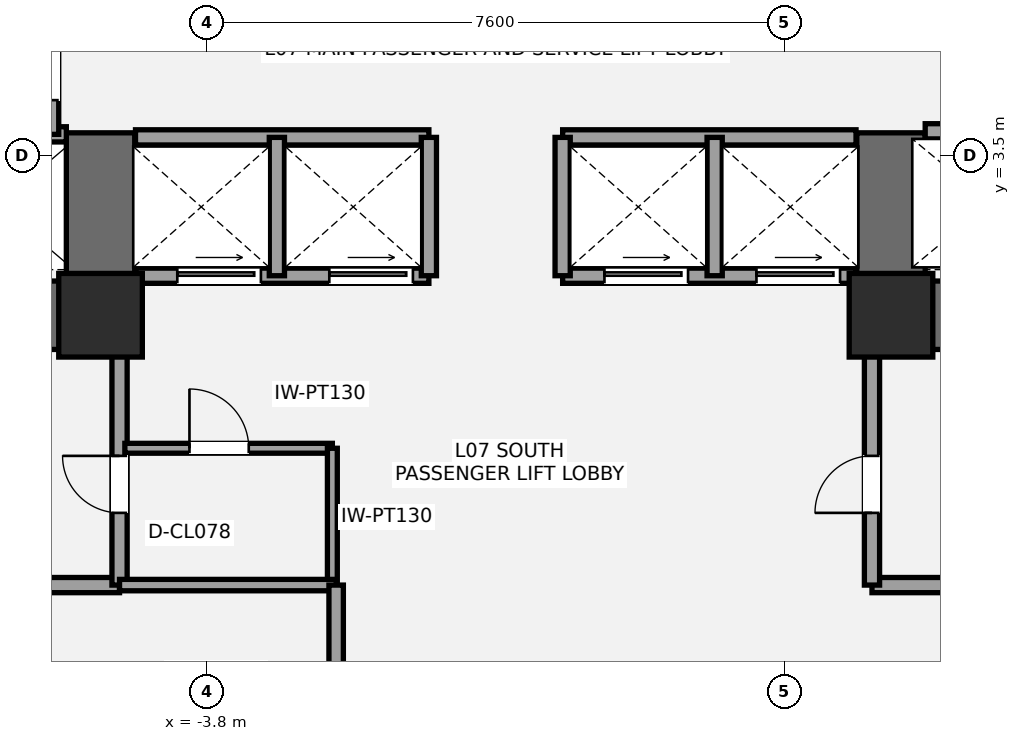
"""IFC4 building model, lengths in metres.
Left out: names, types, materials, properties, quantities, classifications, styles, units other than length and angle.
Written with IfcOpenShell. Run it as: python <this file> out.ifc"""

import sys

from ifc_helpers import new_model, si_unit, direction, frame, frame_2d, origin, origin_2d, place, context, subcontext, project, spatial, rectangle, extrude, element, fill, save


model = new_model("IFC4")
c1 = context("Model", 3, precision=1e-05, world=origin(), true_north=direction((0.0, 1.0)))
c2 = subcontext(c1, "Body", "Model", "MODEL_VIEW")
j1 = project(units=[si_unit("LENGTHUNIT", "METRE"), si_unit("PLANEANGLEUNIT", "RADIAN")], contexts=[c1])
p1 = place(None, origin())
s1 = spatial("IfcSite", under=j1, at=p1, CompositionType="ELEMENT")
p2 = place(p1, origin())
s2 = spatial("IfcBuilding", under=s1, at=p2, CompositionType="ELEMENT")
p3 = place(p2, frame((0.0, 0.0, 30.6)))
s3 = spatial("IfcBuildingStorey", under=s2, at=p3, CompositionType="ELEMENT", Elevation=30.6)
p4 = place(p3, frame((-4.75, 1.4, 0.0), z_axis=(0.0, 0.0, 1.0), x_axis=(-1.0, 0.0, 0.0)))
e1 = element("IfcWall", 1, at=p4, inside=s3, PredefinedType="SHEAR", context=c2, shape_type="SweptSolid", body=[
    extrude(rectangle(XDim=9.3, YDim=0.9, at=frame_2d((4.65, 0.0))), origin(), (0.0, 0.0, 1.0), 3.6),
])
p5 = place(p4, frame((5.55, 0.0, 0.0)))
e2 = element("IfcOpeningElement", 2, at=p5, cuts=e1, PredefinedType="OPENING", context=c2, shape_type="SweptSolid", body=[
    extrude(rectangle(XDim=1.05, YDim=2.15, at=frame_2d((0.525, 1.075))), frame((0.0, 0.46, 0.0), z_axis=(0.0, -1.0, 0.0), x_axis=(1.0, 0.0, 0.0)), (0.0, 0.0, 1.0), 0.92),
])
p6 = place(p4, frame((3.88, 0.0, 0.0)))
e3 = element("IfcOpeningElement", 3, at=p6, cuts=e1, PredefinedType="OPENING", context=c2, shape_type="SweptSolid", body=[
    extrude(rectangle(XDim=1.1, YDim=2.2, at=frame_2d((0.55, 1.1))), frame((0.0, 0.46, 0.0), z_axis=(0.0, -1.0, 0.0), x_axis=(1.0, 0.0, 0.0)), (0.0, 0.0, 1.0), 0.92),
])
p7 = place(p3, frame((-5.2, 0.95, 0.0), z_axis=(0.0, 0.0, 1.0), x_axis=(0.0, 1.0, 0.0)))
e4 = element("IfcWall", 4, at=p7, inside=s3, PredefinedType="SHEAR", context=c2, shape_type="SweptSolid", body=[
    extrude(rectangle(XDim=2.85, YDim=0.9, at=frame_2d((1.425, 0.0))), origin(), (0.0, 0.0, 1.0), 3.6),
])
p8 = place(p3, frame((14.05, 1.4, 0.0), z_axis=(0.0, 0.0, 1.0), x_axis=(-1.0, 0.0, 0.0)))
e5 = element("IfcWall", 5, at=p8, inside=s3, PredefinedType="SHEAR", context=c2, shape_type="SweptSolid", body=[
    extrude(rectangle(XDim=9.3, YDim=0.9, at=frame_2d((4.65, 0.0))), origin(), (0.0, 0.0, 1.0), 3.6),
])
p9 = place(p8, frame((2.7, 0.0, 0.0)))
e6 = element("IfcOpeningElement", 6, at=p9, cuts=e5, PredefinedType="OPENING", context=c2, shape_type="SweptSolid", body=[
    extrude(rectangle(XDim=1.05, YDim=2.15, at=frame_2d((0.525, 1.075))), frame((0.0, 0.46, 0.0), z_axis=(0.0, -1.0, 0.0), x_axis=(1.0, 0.0, 0.0)), (0.0, 0.0, 1.0), 0.92),
])
p10 = place(p8, frame((4.7, 0.0, 0.0)))
e7 = element("IfcOpeningElement", 7, at=p10, cuts=e5, PredefinedType="OPENING", context=c2, shape_type="SweptSolid", body=[
    extrude(rectangle(XDim=1.1, YDim=2.2, at=frame_2d((0.55, 1.1))), frame((0.0, 0.46, 0.0), z_axis=(0.0, -1.0, 0.0), x_axis=(1.0, 0.0, 0.0)), (0.0, 0.0, 1.0), 0.92),
])
p11 = place(p3, frame((5.2, 0.95, 0.0), z_axis=(0.0, 0.0, 1.0), x_axis=(0.0, 1.0, 0.0)))
e8 = element("IfcWall", 8, at=p11, inside=s3, PredefinedType="SHEAR", context=c2, shape_type="SweptSolid", body=[
    extrude(rectangle(XDim=2.85, YDim=0.9, at=frame_2d((1.425, 0.0))), origin(), (0.0, 0.0, 1.0), 3.6),
])
for number, where, z_axis, x_axis in (
    (9, (-5.2, 1.4, 0.0), (0.0, 0.0, 1.0), (1.0, 0.0, 0.0)),
    (10, (5.2, 1.4, 0.0), (0.0, 0.0, 1.0), (1.0, 0.0, 0.0)),
):
    element("IfcColumn", number, at=place(p3, frame(where, z_axis=z_axis, x_axis=x_axis)), inside=s3, PredefinedType="COLUMN", context=c2, shape_type="SweptSolid", body=[
        extrude(rectangle(XDim=1.1, YDim=1.1, at=origin_2d()), origin(), (0.0, 0.0, 1.0), 3.6),
    ])
p12 = place(p3, frame((-7.2, -2.15, 0.0), z_axis=(0.0, 0.0, 1.0), x_axis=(1.0, 0.0, 0.0)))
e11 = element("IfcWall", 11, at=p12, inside=s3, PredefinedType="SOLIDWALL", context=c2, shape_type="SweptSolid", body=[
    extrude(rectangle(XDim=2.25, YDim=0.2, at=frame_2d((1.125, 0.0))), origin(), (0.0, 0.0, 1.0), 3.4),
])
p13 = place(p3, frame((-4.95, -2.15, 0.0), z_axis=(0.0, 0.0, 1.0), x_axis=(0.0, 1.0, 0.0)))
e12 = element("IfcWall", 12, at=p13, inside=s3, PredefinedType="SOLIDWALL", context=c2, shape_type="SweptSolid", body=[
    extrude(rectangle(XDim=3.15, YDim=0.2, at=frame_2d((1.575, 0.0))), origin(), (0.0, 0.0, 1.0), 2.853),
])
p14 = place(p13, frame((0.95, 0.0, 0.0)))
e13 = element("IfcOpeningElement", 13, at=p14, cuts=e12, PredefinedType="OPENING", context=c2, shape_type="SweptSolid", body=[
    extrude(rectangle(XDim=0.75, YDim=2.1, at=frame_2d((0.375, 1.05))), frame((0.0, 0.11, 0.0), z_axis=(0.0, -1.0, 0.0), x_axis=(1.0, 0.0, 0.0)), (0.0, 0.0, 1.0), 0.22),
])
p15 = place(p3, frame((4.95, -2.15, 0.0), z_axis=(0.0, 0.0, 1.0), x_axis=(1.0, 0.0, 0.0)))
e14 = element("IfcWall", 14, at=p15, inside=s3, PredefinedType="SOLIDWALL", context=c2, shape_type="SweptSolid", body=[
    extrude(rectangle(XDim=2.25, YDim=0.2, at=frame_2d((1.125, 0.0))), origin(), (0.0, 0.0, 1.0), 3.4),
])
p16 = place(p3, frame((4.95, -2.15, 0.0), z_axis=(0.0, 0.0, 1.0), x_axis=(0.0, 1.0, 0.0)))
e15 = element("IfcWall", 15, at=p16, inside=s3, PredefinedType="SOLIDWALL", context=c2, shape_type="SweptSolid", body=[
    extrude(rectangle(XDim=3.15, YDim=0.2, at=frame_2d((1.575, 0.0))), origin(), (0.0, 0.0, 1.0), 2.853),
])
p17 = place(p16, frame((0.95, 0.0, 0.0)))
e16 = element("IfcOpeningElement", 16, at=p17, cuts=e15, PredefinedType="OPENING", context=c2, shape_type="SweptSolid", body=[
    extrude(rectangle(XDim=0.75, YDim=2.1, at=frame_2d((0.375, 1.05))), frame((0.0, 0.11, 0.0), z_axis=(0.0, -1.0, 0.0), x_axis=(1.0, 0.0, 0.0)), (0.0, 0.0, 1.0), 0.22),
])
p18 = place(p3, frame((-4.88, -0.35, 0.0), z_axis=(0.0, 0.0, 1.0), x_axis=(1.0, 0.0, 0.0)))
e17 = element("IfcWall", 17, at=p18, inside=s3, PredefinedType="PARTITIONING", context=c2, shape_type="SweptSolid", body=[
    extrude(rectangle(XDim=2.73, YDim=0.13, at=frame_2d((1.365, 0.0))), origin(), (0.0, 0.0, 1.0), 3.4),
])
p19 = place(p18, frame((0.85, 0.0, 0.0)))
e18 = element("IfcOpeningElement", 18, at=p19, cuts=e17, PredefinedType="OPENING", context=c2, shape_type="SweptSolid", body=[
    extrude(rectangle(XDim=0.78, YDim=2.1, at=frame_2d((0.39, 1.05))), frame((0.0, 0.075, 0.0), z_axis=(0.0, -1.0, 0.0), x_axis=(1.0, 0.0, 0.0)), (0.0, 0.0, 1.0), 0.15),
])
p20 = place(p3, frame((-2.15, -2.15, 0.0), z_axis=(0.0, 0.0, 1.0), x_axis=(0.0, 1.0, 0.0)))
e19 = element("IfcWall", 19, at=p20, inside=s3, PredefinedType="PARTITIONING", context=c2, shape_type="SweptSolid", body=[
    extrude(rectangle(XDim=1.8, YDim=0.13, at=frame_2d((0.9, 0.0))), origin(), (0.0, 0.0, 1.0), 3.4),
])
p21 = place(p3, frame((-9.78, 3.78, 0.0), z_axis=(0.0, 0.0, 1.0), x_axis=(1.0, 0.0, 0.0)))
e20 = element("IfcWall", 20, at=p21, inside=s3, PredefinedType="SOLIDWALL", context=c2, shape_type="SweptSolid", body=[
    extrude(rectangle(XDim=4.13, YDim=0.2, at=frame_2d((2.065, 0.0))), origin(), (0.0, 0.0, 1.0), 3.4),
])
p22 = place(p3, frame((-5.85, 3.78, 0.0), z_axis=(0.0, 0.0, 1.0), x_axis=(0.0, 1.0, 0.0)))
e21 = element("IfcWall", 21, at=p22, inside=s3, PredefinedType="SOLIDWALL", context=c2, shape_type="SweptSolid", body=[
    extrude(rectangle(XDim=1.69, YDim=0.2, at=frame_2d((0.845, 0.0))), origin(), (0.0, 0.0, 1.0), 3.4),
])
p23 = place(p22, frame((0.45, 0.0, 0.0)))
e22 = element("IfcOpeningElement", 22, at=p23, cuts=e21, PredefinedType="OPENING", context=c2, shape_type="SweptSolid", body=[
    extrude(rectangle(XDim=0.75, YDim=2.1, at=frame_2d((0.375, 1.05))), frame((0.0, 0.11, 0.0), z_axis=(0.0, -1.0, 0.0), x_axis=(1.0, 0.0, 0.0)), (0.0, 0.0, 1.0), 0.22),
])
p24 = place(p3, frame((5.65, 3.82, 0.0), z_axis=(0.0, 0.0, 1.0), x_axis=(1.0, 0.0, 0.0)))
e23 = element("IfcWall", 23, at=p24, inside=s3, PredefinedType="SOLIDWALL", context=c2, shape_type="SweptSolid", body=[
    extrude(rectangle(XDim=4.13, YDim=0.2, at=frame_2d((2.065, 0.0))), origin(), (0.0, 0.0, 1.0), 3.4),
])
p25 = place(p24, frame((0.65, 0.0, 0.0)))
e24 = element("IfcOpeningElement", 24, at=p25, cuts=e23, PredefinedType="OPENING", context=c2, shape_type="SweptSolid", body=[
    extrude(rectangle(XDim=1.2, YDim=2.2, at=frame_2d((0.6, 1.1))), frame((0.0, 0.11, 0.0), z_axis=(0.0, -1.0, 0.0), x_axis=(1.0, 0.0, 0.0)), (0.0, 0.0, 1.0), 0.22),
])
p26 = place(p3, frame((-4.74, 1.92, 0.0), z_axis=(0.0, 0.0, 1.0), x_axis=(1.0, 0.0, 0.0)))
e25 = element("IfcWall", 25, at=p26, inside=s3, PredefinedType="SOLIDWALL", context=c2, shape_type="SweptSolid", body=[
    extrude(rectangle(XDim=3.86, YDim=0.2, at=frame_2d((1.93, 0.0))), origin(), (0.0, 0.0, 1.0), 2.39),
])
p27 = place(p26, frame((0.55, 0.0, 0.0)))
e26 = element("IfcOpeningElement", 26, at=p27, cuts=e25, PredefinedType="OPENING", context=c2, shape_type="SweptSolid", body=[
    extrude(rectangle(XDim=1.1, YDim=2.2, at=frame_2d((0.55, 1.1))), frame((0.0, 0.11, 0.0), z_axis=(0.0, -1.0, 0.0), x_axis=(1.0, 0.0, 0.0)), (0.0, 0.0, 1.0), 0.22),
])
p28 = place(p26, frame((2.55, 0.0, 0.0)))
e27 = element("IfcOpeningElement", 27, at=p28, cuts=e25, PredefinedType="OPENING", context=c2, shape_type="SweptSolid", body=[
    extrude(rectangle(XDim=1.1, YDim=2.2, at=frame_2d((0.55, 1.1))), frame((0.0, 0.11, 0.0), z_axis=(0.0, -1.0, 0.0), x_axis=(1.0, 0.0, 0.0)), (0.0, 0.0, 1.0), 0.22),
])
p29 = place(p3, frame((0.88, 1.92, 0.0), z_axis=(0.0, 0.0, 1.0), x_axis=(1.0, 0.0, 0.0)))
e28 = element("IfcWall", 28, at=p29, inside=s3, PredefinedType="SOLIDWALL", context=c2, shape_type="SweptSolid", body=[
    extrude(rectangle(XDim=3.86, YDim=0.2, at=frame_2d((1.93, 0.0))), origin(), (0.0, 0.0, 1.0), 2.39),
])
p30 = place(p29, frame((0.55, 0.0, 0.0)))
e29 = element("IfcOpeningElement", 29, at=p30, cuts=e28, PredefinedType="OPENING", context=c2, shape_type="SweptSolid", body=[
    extrude(rectangle(XDim=1.1, YDim=2.2, at=frame_2d((0.55, 1.1))), frame((0.0, 0.11, 0.0), z_axis=(0.0, -1.0, 0.0), x_axis=(1.0, 0.0, 0.0)), (0.0, 0.0, 1.0), 0.22),
])
p31 = place(p29, frame((2.55, 0.0, 0.0)))
e30 = element("IfcOpeningElement", 30, at=p31, cuts=e28, PredefinedType="OPENING", context=c2, shape_type="SweptSolid", body=[
    extrude(rectangle(XDim=1.1, YDim=2.2, at=frame_2d((0.55, 1.1))), frame((0.0, 0.11, 0.0), z_axis=(0.0, -1.0, 0.0), x_axis=(1.0, 0.0, 0.0)), (0.0, 0.0, 1.0), 0.22),
])
for number, where, z_axis, x_axis in (
    (31, (-4.74, 3.74, 0.0), (0.0, 0.0, 1.0), (1.0, 0.0, 0.0)),
    (32, (0.88, 3.74, 0.0), (0.0, 0.0, 1.0), (1.0, 0.0, 0.0)),
):
    element("IfcWall", number, at=place(p3, frame(where, z_axis=z_axis, x_axis=x_axis)), inside=s3, PredefinedType="SOLIDWALL", context=c2, shape_type="SweptSolid", body=[
        extrude(rectangle(XDim=3.86, YDim=0.2, at=frame_2d((1.93, 0.0))), origin(), (0.0, 0.0, 1.0), 3.4),
    ])
for number, where, z_axis, x_axis in (
    (33, (-2.88, 1.92, 0.0), (0.0, 0.0, 1.0), (0.0, 1.0, 0.0)),
    (34, (2.88, 1.92, 0.0), (0.0, 0.0, 1.0), (0.0, 1.0, 0.0)),
    (35, (-0.88, 1.92, 0.0), (0.0, 0.0, 1.0), (0.0, 1.0, 0.0)),
    (36, (0.88, 1.92, 0.0), (0.0, 0.0, 1.0), (0.0, 1.0, 0.0)),
):
    element("IfcWall", number, at=place(p3, frame(where, z_axis=z_axis, x_axis=x_axis)), inside=s3, PredefinedType="SOLIDWALL", context=c2, shape_type="SweptSolid", body=[
        extrude(rectangle(XDim=1.82, YDim=0.2, at=frame_2d((0.91, 0.0))), origin(), (0.0, 0.0, 1.0), 3.4),
    ])
p32 = place(p3, frame((-4.95, -2.15, 0.0), z_axis=(0.0, 0.0, 1.0), x_axis=(1.0, 0.0, 0.0)))
e37 = element("IfcWall", 37, at=p32, inside=s3, PredefinedType="PLUMBINGWALL", context=c2, shape_type="SweptSolid", body=[
    extrude(rectangle(XDim=2.85, YDim=0.15, at=frame_2d((1.425, 0.0))), origin(), (0.0, 0.0, 1.0), 3.4),
])
p33 = place(p3, frame((-2.1, -4.05, 0.0), z_axis=(0.0, 0.0, 1.0), x_axis=(0.0, 1.0, 0.0)))
e38 = element("IfcWall", 38, at=p33, inside=s3, PredefinedType="PLUMBINGWALL", context=c2, shape_type="SweptSolid", body=[
    extrude(rectangle(XDim=1.9, YDim=0.19, at=frame_2d((0.95, 0.0))), origin(), (0.0, 0.0, 1.0), 3.4),
])
p34 = place(p14, origin())
e39 = element("IfcDoor", 39, at=p34, inside=s3, OperationType="SINGLE_SWING_RIGHT", PredefinedType="DOOR", context=c2, shape_type="SweptSolid", body=[
    extrude(rectangle(XDim=0.75, YDim=2.1, at=frame_2d((0.375, 1.05))), frame((0.0, 0.025, 0.0), z_axis=(0.0, -1.0, 0.0), x_axis=(1.0, 0.0, 0.0)), (0.0, 0.0, 1.0), 0.05),
])
fill(e13, e39)
p35 = place(p17, origin())
e40 = element("IfcDoor", 40, at=p35, inside=s3, OperationType="SINGLE_SWING_LEFT", PredefinedType="DOOR", context=c2, shape_type="SweptSolid", body=[
    extrude(rectangle(XDim=0.75, YDim=2.1, at=frame_2d((0.375, 1.05))), frame((0.0, 0.025, 0.0), z_axis=(0.0, -1.0, 0.0), x_axis=(1.0, 0.0, 0.0)), (0.0, 0.0, 1.0), 0.05),
])
fill(e16, e40)
p36 = place(p19, origin())
e41 = element("IfcDoor", 41, at=p36, inside=s3, OperationType="SINGLE_SWING_LEFT", PredefinedType="DOOR", context=c2, shape_type="SweptSolid", body=[
    extrude(rectangle(XDim=0.78, YDim=2.1, at=frame_2d((0.39, 1.05))), frame((0.0, 0.025, 0.0), z_axis=(0.0, -1.0, 0.0), x_axis=(1.0, 0.0, 0.0)), (0.0, 0.0, 1.0), 0.05),
])
fill(e18, e41)
p37 = place(p23, origin())
e42 = element("IfcDoor", 42, at=p37, inside=s3, OperationType="SINGLE_SWING_RIGHT", PredefinedType="DOOR", context=c2, shape_type="SweptSolid", body=[
    extrude(rectangle(XDim=0.75, YDim=2.1, at=frame_2d((0.375, 1.05))), frame((0.0, 0.025, 0.0), z_axis=(0.0, -1.0, 0.0), x_axis=(1.0, 0.0, 0.0)), (0.0, 0.0, 1.0), 0.05),
])
fill(e22, e42)
p38 = place(p27, origin())
e43 = element("IfcDoor", 43, at=p38, inside=s3, OperationType="SLIDING_TO_LEFT", PredefinedType="DOOR", context=c2, shape_type="SweptSolid", body=[
    extrude(rectangle(XDim=1.1, YDim=2.2, at=frame_2d((0.55, 1.1))), frame((0.0, 0.025, 0.0), z_axis=(0.0, -1.0, 0.0), x_axis=(1.0, 0.0, 0.0)), (0.0, 0.0, 1.0), 0.05),
])
fill(e26, e43)
p39 = place(p28, origin())
e44 = element("IfcDoor", 44, at=p39, inside=s3, OperationType="SLIDING_TO_LEFT", PredefinedType="DOOR", context=c2, shape_type="SweptSolid", body=[
    extrude(rectangle(XDim=1.1, YDim=2.2, at=frame_2d((0.55, 1.1))), frame((0.0, 0.025, 0.0), z_axis=(0.0, -1.0, 0.0), x_axis=(1.0, 0.0, 0.0)), (0.0, 0.0, 1.0), 0.05),
])
fill(e27, e44)
p40 = place(p30, origin())
e45 = element("IfcDoor", 45, at=p40, inside=s3, OperationType="SLIDING_TO_LEFT", PredefinedType="DOOR", context=c2, shape_type="SweptSolid", body=[
    extrude(rectangle(XDim=1.1, YDim=2.2, at=frame_2d((0.55, 1.1))), frame((0.0, 0.025, 0.0), z_axis=(0.0, -1.0, 0.0), x_axis=(1.0, 0.0, 0.0)), (0.0, 0.0, 1.0), 0.05),
])
fill(e29, e45)
p41 = place(p31, origin())
e46 = element("IfcDoor", 46, at=p41, inside=s3, OperationType="SLIDING_TO_LEFT", PredefinedType="DOOR", context=c2, shape_type="SweptSolid", body=[
    extrude(rectangle(XDim=1.1, YDim=2.2, at=frame_2d((0.55, 1.1))), frame((0.0, 0.025, 0.0), z_axis=(0.0, -1.0, 0.0), x_axis=(1.0, 0.0, 0.0)), (0.0, 0.0, 1.0), 0.05),
])
fill(e30, e46)
save(model, sys.argv[1])
